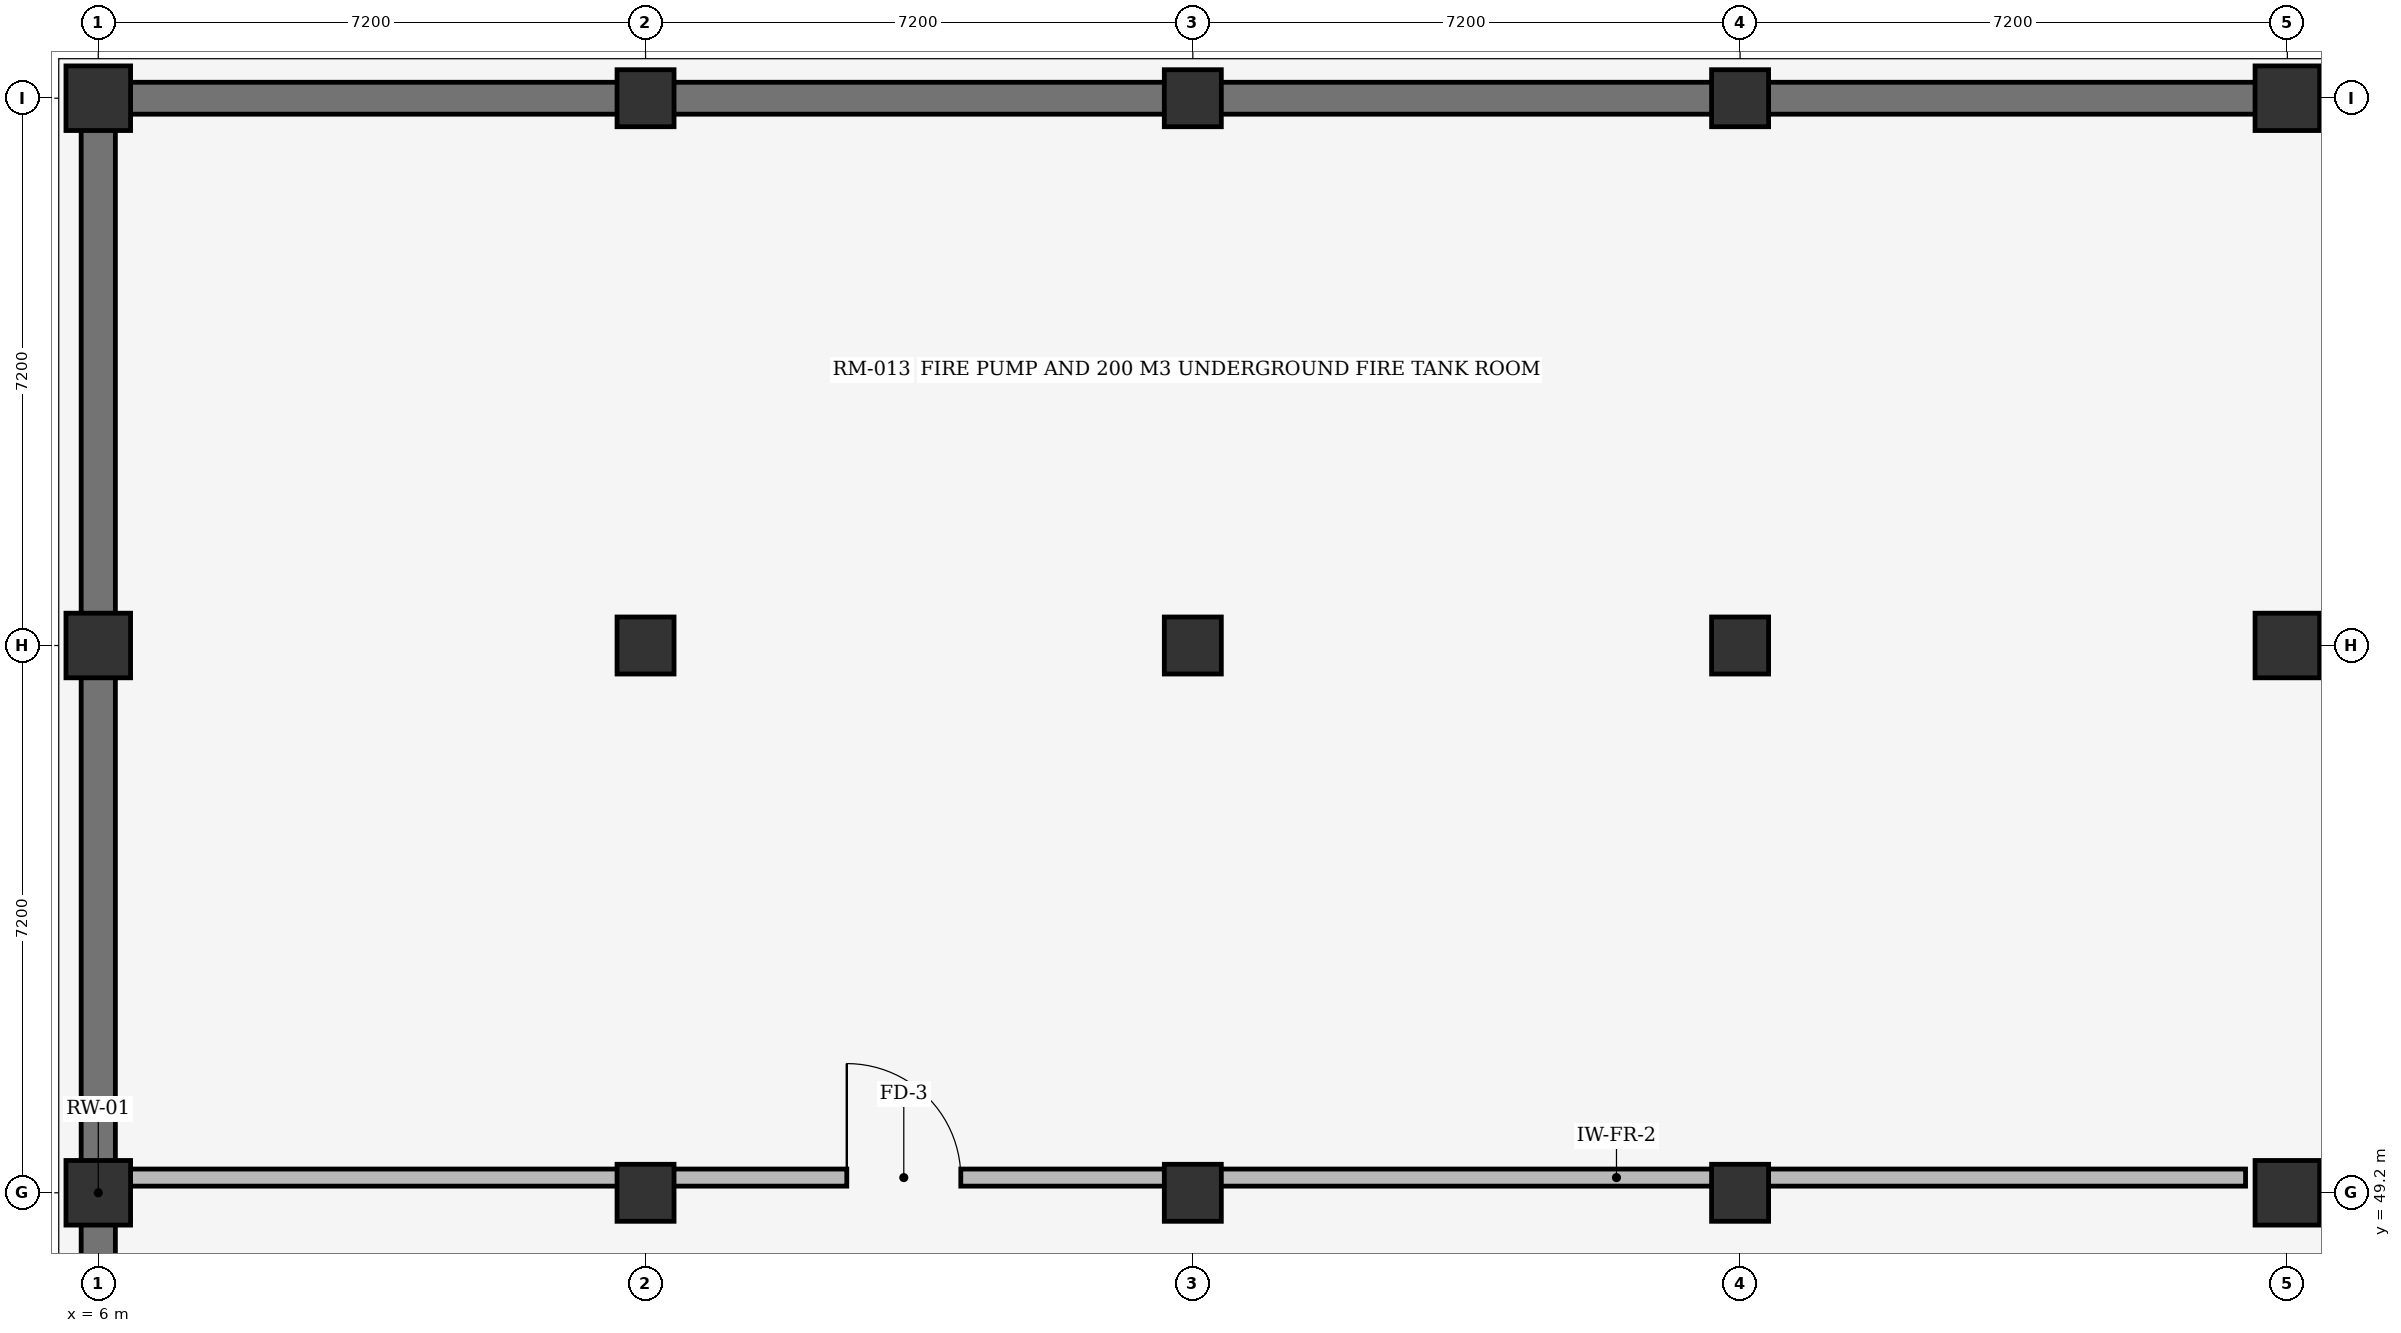
"""IFC4 building model, lengths in metres.
Left out: names, types, materials, properties, quantities, classifications, styles, units other than length and angle.
Written with IfcOpenShell. Run it as: python <this file> out.ifc"""

import sys

from ifc_helpers import new_model, si_unit, direction, frame, frame_2d, origin, origin_2d, place, context, subcontext, project, spatial, rectangle, extrude, element, fill, save


model = new_model("IFC4")
c1 = context("Model", 3, precision=1e-05, world=origin(), true_north=direction((0.0, 1.0)))
c2 = subcontext(c1, "Body", "Model", "MODEL_VIEW")
j1 = project(units=[si_unit("LENGTHUNIT", "METRE"), si_unit("PLANEANGLEUNIT", "RADIAN")], contexts=[c1])
p1 = place(None, origin())
s1 = spatial("IfcSite", under=j1, at=p1, CompositionType="ELEMENT")
p2 = place(p1, origin())
s2 = spatial("IfcBuilding", under=s1, at=p2, CompositionType="ELEMENT")
p3 = place(p2, frame((0.0, 0.0, -4.8)))
s3 = spatial("IfcBuildingStorey", under=s2, at=p3, CompositionType="ELEMENT", Elevation=-4.8)
for number, where, z_axis, x_axis in (
    (1, (6.0, 49.2, 0.0), (0.0, 0.0, 1.0), (1.0, 0.0, 0.0)),
    (2, (6.0, 56.4, 0.0), (0.0, 0.0, 1.0), (1.0, 0.0, 0.0)),
    (3, (6.0, 63.6, 0.0), (0.0, 0.0, 1.0), (1.0, 0.0, 0.0)),
    (4, (34.8, 49.2, 0.0), (0.0, 0.0, 1.0), (1.0, 0.0, 0.0)),
    (5, (34.8, 56.4, 0.0), (0.0, 0.0, 1.0), (1.0, 0.0, 0.0)),
    (6, (34.8, 63.6, 0.0), (0.0, 0.0, 1.0), (1.0, 0.0, 0.0)),
):
    element("IfcColumn", number, at=place(p3, frame(where, z_axis=z_axis, x_axis=x_axis)), inside=s3, PredefinedType="COLUMN", context=c2, shape_type="SweptSolid", body=[
        extrude(rectangle(XDim=0.85, YDim=0.85, at=origin_2d()), origin(), (0.0, 0.0, 1.0), 4.5),
    ])
for number, where, z_axis, x_axis in (
    (7, (13.2, 49.2, 0.0), (0.0, 0.0, 1.0), (1.0, 0.0, 0.0)),
    (8, (13.2, 56.4, 0.0), (0.0, 0.0, 1.0), (1.0, 0.0, 0.0)),
    (9, (13.2, 63.6, 0.0), (0.0, 0.0, 1.0), (1.0, 0.0, 0.0)),
    (10, (20.4, 49.2, 0.0), (0.0, 0.0, 1.0), (1.0, 0.0, 0.0)),
    (11, (20.4, 56.4, 0.0), (0.0, 0.0, 1.0), (1.0, 0.0, 0.0)),
    (12, (20.4, 63.6, 0.0), (0.0, 0.0, 1.0), (1.0, 0.0, 0.0)),
    (13, (27.6, 49.2, 0.0), (0.0, 0.0, 1.0), (1.0, 0.0, 0.0)),
    (14, (27.6, 56.4, 0.0), (0.0, 0.0, 1.0), (1.0, 0.0, 0.0)),
    (15, (27.6, 63.6, 0.0), (0.0, 0.0, 1.0), (1.0, 0.0, 0.0)),
):
    element("IfcColumn", number, at=place(p3, frame(where, z_axis=z_axis, x_axis=x_axis)), inside=s3, PredefinedType="COLUMN", context=c2, shape_type="SweptSolid", body=[
        extrude(rectangle(XDim=0.75, YDim=0.75, at=origin_2d()), origin(), (0.0, 0.0, 1.0), 4.5),
    ])
p4 = place(p3, frame((69.0, 63.6, 0.0), z_axis=(0.0, 0.0, 1.0), x_axis=(-1.0, 0.0, 0.0)))
e16 = element("IfcWall", 16, at=p4, inside=s3, PredefinedType="USERDEFINED", context=c2, shape_type="SweptSolid", body=[
    extrude(rectangle(XDim=63.0, YDim=0.42, at=frame_2d((31.5, 0.0))), origin(), (0.0, 0.0, 1.0), 4.5),
])
p5 = place(p3, frame((6.0, 63.6, 0.0), z_axis=(0.0, 0.0, 1.0), x_axis=(0.0, -1.0, 0.0)))
e17 = element("IfcWall", 17, at=p5, inside=s3, PredefinedType="USERDEFINED", context=c2, shape_type="SweptSolid", body=[
    extrude(rectangle(XDim=28.8, YDim=0.45, at=frame_2d((14.4, 0.0))), origin(), (0.0, 0.0, 1.0), 4.5),
])
p6 = place(p3, frame((6.4, 49.4, 0.0), z_axis=(0.0, 0.0, 1.0), x_axis=(1.0, 0.0, 0.0)))
e18 = element("IfcWall", 18, at=p6, inside=s3, PredefinedType="SOLIDWALL", context=c2, shape_type="SweptSolid", body=[
    extrude(rectangle(XDim=27.85, YDim=0.225, at=frame_2d((13.925, 0.0))), origin(), (0.0, 0.0, 1.0), 3.89),
])
p7 = place(p6, frame((9.448, 0.0, 0.0)))
e19 = element("IfcOpeningElement", 19, at=p7, cuts=e18, PredefinedType="OPENING", context=c2, shape_type="SweptSolid", body=[
    extrude(rectangle(XDim=1.5, YDim=2.2, at=frame_2d((0.75, 1.1))), frame((0.0, 0.123, 0.0), z_axis=(0.0, -1.0, 0.0), x_axis=(1.0, 0.0, 0.0)), (0.0, 0.0, 1.0), 0.245),
])
p8 = place(p7, origin())
e20 = element("IfcDoor", 20, at=p8, inside=s3, OperationType="SINGLE_SWING_LEFT", PredefinedType="DOOR", context=c2, shape_type="SweptSolid", body=[
    extrude(rectangle(XDim=1.5, YDim=2.2, at=frame_2d((0.75, 1.1))), frame((0.0, 0.025, 0.0), z_axis=(0.0, -1.0, 0.0), x_axis=(1.0, 0.0, 0.0)), (0.0, 0.0, 1.0), 0.05),
])
fill(e19, e20)
save(model, sys.argv[1])
